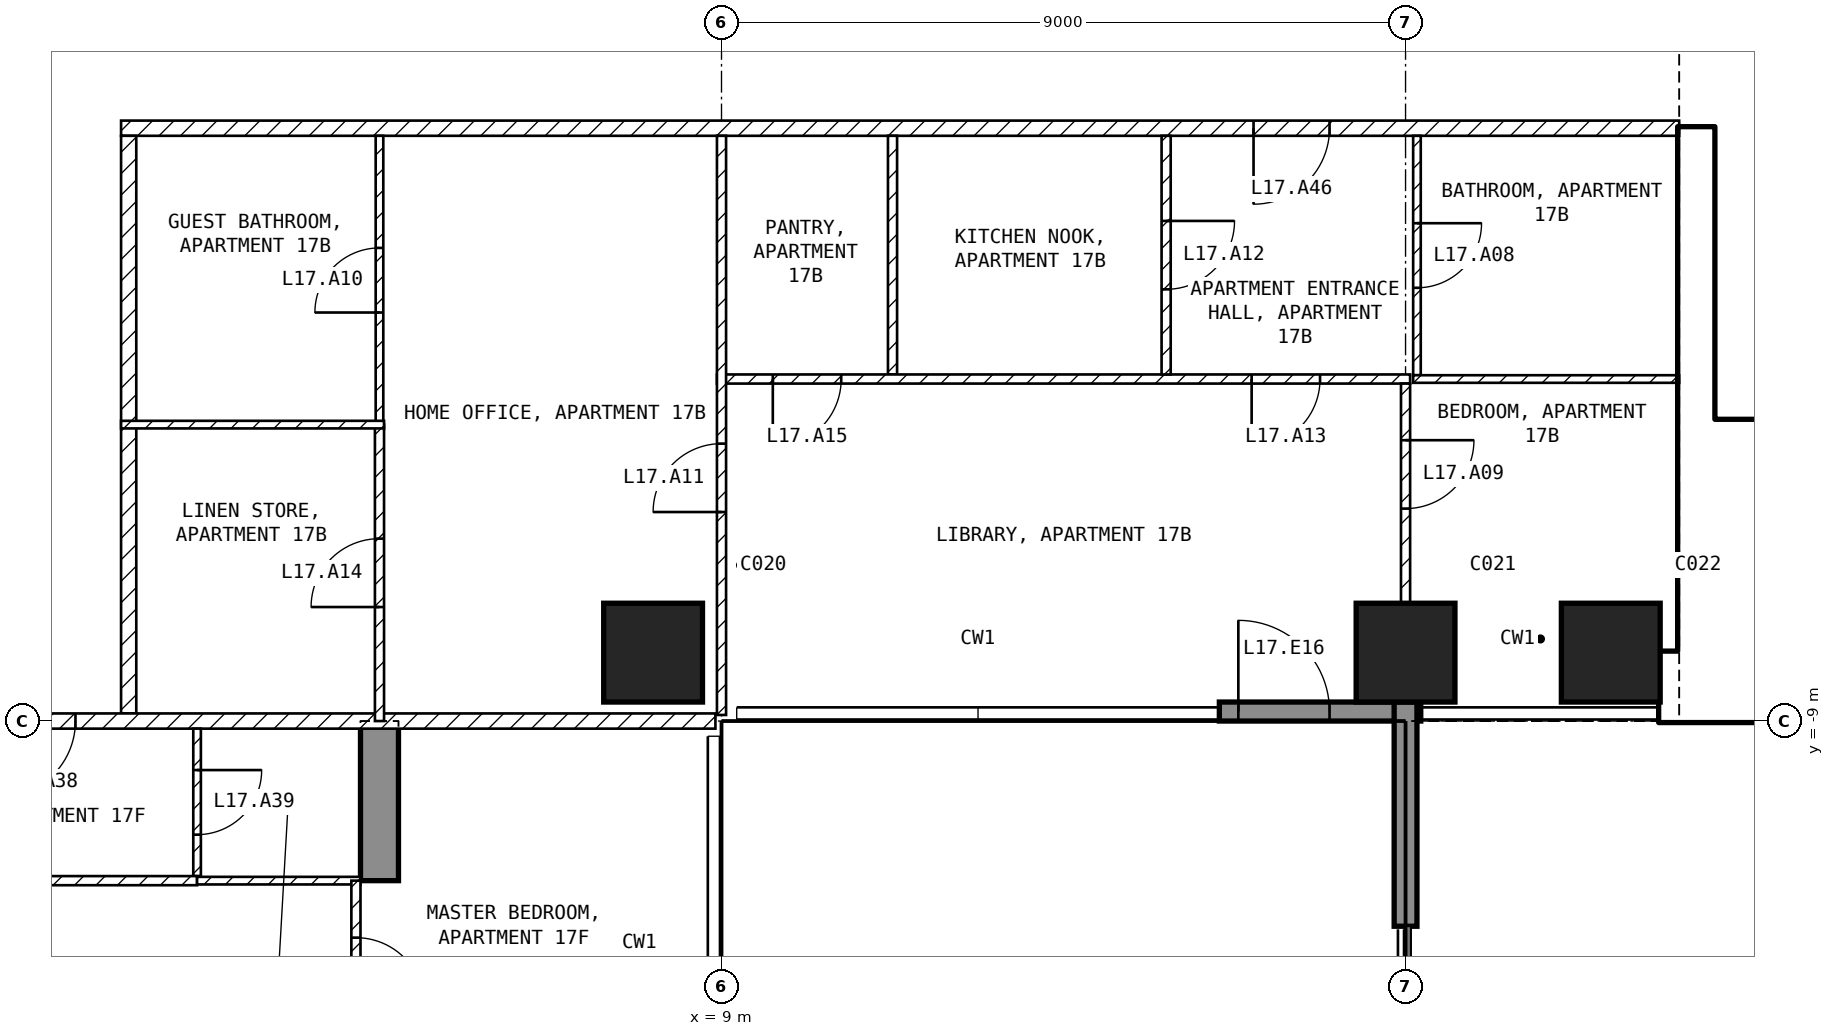
"""IFC4 building model, lengths in metres.
Left out: names, types, materials, properties, quantities, classifications, styles, units other than length and angle.
Written with IfcOpenShell. Run it as: python <this file> out.ifc"""

import sys

from ifc_helpers import new_model, si_unit, direction, frame, frame_2d, origin, origin_2d, place, context, subcontext, project, spatial, polyline, rectangle, outline, extrude, element, fill, save


model = new_model("IFC4")
c1 = context("Model", 3, precision=1e-05, world=origin(), true_north=direction((0.0, 1.0)))
c2 = subcontext(c1, "Body", "Model", "MODEL_VIEW")
j1 = project(units=[si_unit("LENGTHUNIT", "METRE"), si_unit("PLANEANGLEUNIT", "RADIAN")], contexts=[c1])
p1 = place(None, origin())
s1 = spatial("IfcSite", under=j1, at=p1, CompositionType="ELEMENT")
p2 = place(p1, origin())
s2 = spatial("IfcBuilding", under=s1, at=p2, CompositionType="ELEMENT")
p3 = place(p2, frame((0.0, 0.0, 78.5)))
s3 = spatial("IfcBuildingStorey", under=s2, at=p3, CompositionType="ELEMENT", Elevation=78.5)
for number, where, z_axis, x_axis in (
    (1, (8.1, -8.1, -0.25), (0.0, 0.0, 1.0), (1.0, 0.0, 0.0)),
    (2, (18.0, -8.1, -0.25), (0.0, 0.0, 1.0), (1.0, 0.0, 0.0)),
    (3, (20.7, -8.1, -0.25), (0.0, 0.0, 1.0), (1.0, 0.0, 0.0)),
):
    element("IfcColumn", number, at=place(p3, frame(where, z_axis=z_axis, x_axis=x_axis)), inside=s3, PredefinedType="COLUMN", context=c2, shape_type="SweptSolid", body=[
        extrude(rectangle(XDim=1.3, YDim=1.3, at=origin_2d()), origin(), (0.0, 0.0, 1.0), 3.5),
    ])
p4 = place(p3, frame((4.25, -25.45, -0.25), z_axis=(1.0, 0.0, 0.0), x_axis=(0.0, 1.0, 0.0)))
e4 = element("IfcWall", 4, at=p4, inside=s3, PredefinedType="SHEAR", context=c2, shape_type="SweptSolid", body=[
    extrude(outline(polyline([(0.0, 0.0), (4.15, 0.0), (4.15, 2.65), (6.55, 2.65), (6.55, 0.0), (11.95, 0.0), (11.95, 2.65), (14.35, 2.65), (14.35, 0.0), (16.45, 0.0), (16.45, 3.5), (0.0, 3.5), (0.0, 0.0)])), origin(), (0.0, 0.0, 1.0), 0.5),
])
p5 = place(p3, frame((15.55, -8.875, 0.0), z_axis=(0.0, 0.0, 1.0), x_axis=(1.0, 0.0, 0.0)))
e5 = element("IfcWall", 5, at=p5, inside=s3, PredefinedType="SOLIDWALL", context=c2, shape_type="SweptSolid", body=[
    extrude(rectangle(XDim=2.65, YDim=0.25, at=frame_2d((1.325, 0.0))), origin(), (0.0, 0.0, 1.0), 3.25),
])
p6 = place(p5, frame((0.25, 0.0, 0.0)))
e6 = element("IfcOpeningElement", 6, at=p6, cuts=e5, PredefinedType="OPENING", context=c2, shape_type="SweptSolid", body=[
    extrude(rectangle(XDim=1.2, YDim=2.4, at=frame_2d((0.6, 1.2))), frame((0.0, 0.135, 0.0), z_axis=(0.0, -1.0, 0.0), x_axis=(1.0, 0.0, 0.0)), (0.0, 0.0, 1.0), 0.27),
])
p7 = place(p3, frame((18.0, -8.75, 0.0), z_axis=(0.0, 0.0, 1.0), x_axis=(0.0, -1.0, 0.0)))
e7 = element("IfcWall", 7, at=p7, inside=s3, PredefinedType="SOLIDWALL", context=c2, shape_type="SweptSolid", body=[
    extrude(rectangle(XDim=2.95, YDim=0.3, at=frame_2d((1.475, 0.0))), origin(), (0.0, 0.0, 1.0), 3.25),
])
p8 = place(p3, frame((21.35, -8.55, 0.0), z_axis=(0.0, 0.0, 1.0), x_axis=(1.0, 0.0, 0.0)))
e8 = element("IfcWall", 8, at=p8, inside=s3, PredefinedType="SHEAR", context=c2, shape_type="SweptSolid", body=[
    extrude(rectangle(XDim=11.05, YDim=0.9, at=frame_2d((5.525, 0.0))), origin(), (0.0, 0.0, 1.0), 3.25),
])
p9 = place(p3, frame((21.825, -8.1, 0.0), z_axis=(0.0, 0.0, 1.0), x_axis=(0.0, 1.0, 0.0)))
e9 = element("IfcWall", 9, at=p9, inside=s3, PredefinedType="SHEAR", context=c2, shape_type="SweptSolid", body=[
    extrude(rectangle(XDim=6.9, YDim=0.45, at=frame_2d((3.45, 0.0))), origin(), (0.0, 0.0, 1.0), 3.25),
])
p10 = place(p3, frame((22.05, -5.15, 0.0), z_axis=(0.0, 0.0, 1.0), x_axis=(1.0, 0.0, 0.0)))
e10 = element("IfcWall", 10, at=p10, inside=s3, PredefinedType="SOLIDWALL", context=c2, shape_type="SweptSolid", body=[
    extrude(rectangle(XDim=6.3, YDim=0.2, at=frame_2d((3.15, 0.0))), origin(), (0.0, 0.0, 1.0), 3.25),
])
p11 = place(p10, frame((0.2, 0.0, 0.0)))
e11 = element("IfcOpeningElement", 11, at=p11, cuts=e10, PredefinedType="OPENING", context=c2, shape_type="SweptSolid", body=[
    extrude(rectangle(XDim=1.0, YDim=2.1, at=frame_2d((0.5, 1.05))), frame((0.0, 0.11, 0.0), z_axis=(0.0, -1.0, 0.0), x_axis=(1.0, 0.0, 0.0)), (0.0, 0.0, 1.0), 0.22),
])
p12 = place(p3, frame((21.6, -1.2, 0.0), z_axis=(0.0, 0.0, 1.0), x_axis=(-1.0, 0.0, 0.0)))
e12 = element("IfcWall", 12, at=p12, inside=s3, PredefinedType="PARTITIONING", context=c2, shape_type="SweptSolid", body=[
    extrude(rectangle(XDim=20.5, YDim=0.2, at=frame_2d((10.25, 0.0))), origin(), (0.0, 0.0, 1.0), 3.25),
])
p13 = place(p12, frame((4.6, 0.0, 0.0)))
e13 = element("IfcOpeningElement", 13, at=p13, cuts=e12, PredefinedType="OPENING", context=c2, shape_type="SweptSolid", body=[
    extrude(rectangle(XDim=1.0, YDim=2.1, at=frame_2d((0.5, 1.05))), frame((0.0, 0.11, 0.0), z_axis=(0.0, -1.0, 0.0), x_axis=(1.0, 0.0, 0.0)), (0.0, 0.0, 1.0), 0.22),
])
p14 = place(p3, frame((1.2, -1.3, 0.0), z_axis=(0.0, 0.0, 1.0), x_axis=(0.0, -1.0, 0.0)))
e14 = element("IfcWall", 14, at=p14, inside=s3, PredefinedType="PARTITIONING", context=c2, shape_type="SweptSolid", body=[
    extrude(rectangle(XDim=7.6, YDim=0.2, at=frame_2d((3.8, 0.0))), origin(), (0.0, 0.0, 1.0), 3.25),
])
p15 = place(p3, frame((8.92, -9.0, 0.0), z_axis=(0.0, 0.0, 1.0), x_axis=(-1.0, 0.0, 0.0)))
e15 = element("IfcWall", 15, at=p15, inside=s3, PredefinedType="PARTITIONING", context=c2, shape_type="SweptSolid", body=[
    extrude(rectangle(XDim=17.84, YDim=0.2, at=frame_2d((8.92, 0.0))), origin(), (0.0, 0.0, 1.0), 3.25),
])
p16 = place(p15, frame((8.42, 0.0, 0.0)))
e16 = element("IfcOpeningElement", 16, at=p16, cuts=e15, PredefinedType="OPENING", context=c2, shape_type="SweptSolid", body=[
    extrude(rectangle(XDim=1.0, YDim=2.1, at=frame_2d((0.5, 1.05))), frame((0.0, 0.11, 0.0), z_axis=(0.0, -1.0, 0.0), x_axis=(1.0, 0.0, 0.0)), (0.0, 0.0, 1.0), 0.22),
])
p17 = place(p3, frame((11.25, -1.3, 0.0), z_axis=(0.0, 0.0, 1.0), x_axis=(0.0, -1.0, 0.0)))
e17 = element("IfcWall", 17, at=p17, inside=s3, PredefinedType="PARTITIONING", context=c2, shape_type="SweptSolid", body=[
    extrude(rectangle(XDim=3.14, YDim=0.12, at=frame_2d((1.57, 0.0))), origin(), (0.0, 0.0, 1.0), 3.25),
])
p18 = place(p3, frame((18.06, -4.5, 0.0), z_axis=(0.0, 0.0, 1.0), x_axis=(-1.0, 0.0, 0.0)))
e18 = element("IfcWall", 18, at=p18, inside=s3, PredefinedType="PARTITIONING", context=c2, shape_type="SweptSolid", body=[
    extrude(rectangle(XDim=9.12, YDim=0.12, at=frame_2d((4.56, 0.0))), origin(), (0.0, 0.0, 1.0), 3.25),
])
p19 = place(p18, frame((1.185, 0.0, 0.0)))
e19 = element("IfcOpeningElement", 19, at=p19, cuts=e18, PredefinedType="OPENING", context=c2, shape_type="SweptSolid", body=[
    extrude(rectangle(XDim=0.9, YDim=2.1, at=frame_2d((0.45, 1.05))), frame((0.0, 0.07, 0.0), z_axis=(0.0, -1.0, 0.0), x_axis=(1.0, 0.0, 0.0)), (0.0, 0.0, 1.0), 0.14),
])
p20 = place(p18, frame((7.485, 0.0, 0.0)))
e20 = element("IfcOpeningElement", 20, at=p20, cuts=e18, PredefinedType="OPENING", context=c2, shape_type="SweptSolid", body=[
    extrude(rectangle(XDim=0.9, YDim=2.1, at=frame_2d((0.45, 1.05))), frame((0.0, 0.07, 0.0), z_axis=(0.0, -1.0, 0.0), x_axis=(1.0, 0.0, 0.0)), (0.0, 0.0, 1.0), 0.14),
])
p21 = place(p3, frame((9.0, -8.92, 0.0), z_axis=(0.0, 0.0, 1.0), x_axis=(0.0, 1.0, 0.0)))
e21 = element("IfcWall", 21, at=p21, inside=s3, PredefinedType="PARTITIONING", context=c2, shape_type="SweptSolid", body=[
    extrude(rectangle(XDim=7.62, YDim=0.12, at=frame_2d((3.81, 0.0))), origin(), (0.0, 0.0, 1.0), 3.25),
])
p22 = place(p21, frame((2.67, 0.0, 0.0)))
e22 = element("IfcOpeningElement", 22, at=p22, cuts=e21, PredefinedType="OPENING", context=c2, shape_type="SweptSolid", body=[
    extrude(rectangle(XDim=0.9, YDim=2.1, at=frame_2d((0.45, 1.05))), frame((0.0, 0.07, 0.0), z_axis=(0.0, -1.0, 0.0), x_axis=(1.0, 0.0, 0.0)), (0.0, 0.0, 1.0), 0.14),
])
p23 = place(p3, frame((14.85, -1.3, 0.0), z_axis=(0.0, 0.0, 1.0), x_axis=(0.0, -1.0, 0.0)))
e23 = element("IfcWall", 23, at=p23, inside=s3, PredefinedType="PARTITIONING", context=c2, shape_type="SweptSolid", body=[
    extrude(rectangle(XDim=3.14, YDim=0.12, at=frame_2d((1.57, 0.0))), origin(), (0.0, 0.0, 1.0), 3.25),
])
p24 = place(p23, frame((1.12, 0.0, 0.0)))
e24 = element("IfcOpeningElement", 24, at=p24, cuts=e23, PredefinedType="OPENING", context=c2, shape_type="SweptSolid", body=[
    extrude(rectangle(XDim=0.9, YDim=2.1, at=frame_2d((0.45, 1.05))), frame((0.0, 0.07, 0.0), z_axis=(0.0, -1.0, 0.0), x_axis=(1.0, 0.0, 0.0)), (0.0, 0.0, 1.0), 0.14),
])
p25 = place(p3, frame((18.15, -1.3, 0.0), z_axis=(0.0, 0.0, 1.0), x_axis=(0.0, -1.0, 0.0)))
e25 = element("IfcWall", 25, at=p25, inside=s3, PredefinedType="PARTITIONING", context=c2, shape_type="SweptSolid", body=[
    extrude(rectangle(XDim=3.15, YDim=0.1, at=frame_2d((1.575, 0.0))), origin(), (0.0, 0.0, 1.0), 2.346),
])
p26 = place(p25, frame((1.15, 0.0, 0.0)))
e26 = element("IfcOpeningElement", 26, at=p26, cuts=e25, PredefinedType="OPENING", context=c2, shape_type="SweptSolid", body=[
    extrude(rectangle(XDim=0.85, YDim=2.1, at=frame_2d((0.425, 1.05))), frame((0.0, 0.06, 0.0), z_axis=(0.0, -1.0, 0.0), x_axis=(1.0, 0.0, 0.0)), (0.0, 0.0, 1.0), 0.12),
])
p27 = place(p3, frame((21.6, -4.5, 0.0), z_axis=(0.0, 0.0, 1.0), x_axis=(-1.0, 0.0, 0.0)))
e27 = element("IfcWall", 27, at=p27, inside=s3, PredefinedType="PARTITIONING", context=c2, shape_type="SweptSolid", body=[
    extrude(rectangle(XDim=3.5, YDim=0.1, at=frame_2d((1.75, 0.0))), origin(), (0.0, 0.0, 1.0), 3.25),
])
p28 = place(p3, frame((18.0, -4.56, 0.0), z_axis=(0.0, 0.0, 1.0), x_axis=(0.0, -1.0, 0.0)))
e28 = element("IfcWall", 28, at=p28, inside=s3, PredefinedType="PARTITIONING", context=c2, shape_type="SweptSolid", body=[
    extrude(rectangle(XDim=2.89, YDim=0.12, at=frame_2d((1.445, 0.0))), origin(), (0.0, 0.0, 1.0), 2.346),
])
p29 = place(p28, frame((0.745, 0.0, 0.0)))
e29 = element("IfcOpeningElement", 29, at=p29, cuts=e28, PredefinedType="OPENING", context=c2, shape_type="SweptSolid", body=[
    extrude(rectangle(XDim=0.9, YDim=2.1, at=frame_2d((0.45, 1.05))), frame((0.0, 0.07, 0.0), z_axis=(0.0, -1.0, 0.0), x_axis=(1.0, 0.0, 0.0)), (0.0, 0.0, 1.0), 0.14),
])
p30 = place(p3, frame((4.5, -5.1, 0.0), z_axis=(0.0, 0.0, 1.0), x_axis=(0.0, 1.0, 0.0)))
e30 = element("IfcWall", 30, at=p30, inside=s3, PredefinedType="PARTITIONING", context=c2, shape_type="SweptSolid", body=[
    extrude(rectangle(XDim=3.8, YDim=0.1, at=frame_2d((1.9, 0.0))), origin(), (0.0, 0.0, 1.0), 3.25),
])
p31 = place(p30, frame((1.475, 0.0, 0.0)))
e31 = element("IfcOpeningElement", 31, at=p31, cuts=e30, PredefinedType="OPENING", context=c2, shape_type="SweptSolid", body=[
    extrude(rectangle(XDim=0.85, YDim=2.1, at=frame_2d((0.425, 1.05))), frame((0.0, 0.06, 0.0), z_axis=(0.0, -1.0, 0.0), x_axis=(1.0, 0.0, 0.0)), (0.0, 0.0, 1.0), 0.12),
])
p32 = place(p3, frame((4.5, -9.0, 0.0), z_axis=(0.0, 0.0, 1.0), x_axis=(0.0, 1.0, 0.0)))
e32 = element("IfcWall", 32, at=p32, inside=s3, PredefinedType="PARTITIONING", context=c2, shape_type="SweptSolid", body=[
    extrude(rectangle(XDim=3.9, YDim=0.12, at=frame_2d((1.95, 0.0))), origin(), (0.0, 0.0, 1.0), 3.25),
])
p33 = place(p32, frame((1.5, 0.0, 0.0)))
e33 = element("IfcOpeningElement", 33, at=p33, cuts=e32, PredefinedType="OPENING", context=c2, shape_type="SweptSolid", body=[
    extrude(rectangle(XDim=0.9, YDim=2.1, at=frame_2d((0.45, 1.05))), frame((0.0, 0.07, 0.0), z_axis=(0.0, -1.0, 0.0), x_axis=(1.0, 0.0, 0.0)), (0.0, 0.0, 1.0), 0.14),
])
p34 = place(p3, frame((4.56, -5.1, 0.0), z_axis=(0.0, 0.0, 1.0), x_axis=(-1.0, 0.0, 0.0)))
e34 = element("IfcWall", 34, at=p34, inside=s3, PredefinedType="PARTITIONING", context=c2, shape_type="SweptSolid", body=[
    extrude(rectangle(XDim=3.46, YDim=0.1, at=frame_2d((1.73, 0.0))), origin(), (0.0, 0.0, 1.0), 3.25),
])
p35 = place(p3, frame((2.1, -9.1, 0.0), z_axis=(0.0, 0.0, 1.0), x_axis=(0.0, -1.0, 0.0)))
e35 = element("IfcWall", 35, at=p35, inside=s3, PredefinedType="PARTITIONING", context=c2, shape_type="SweptSolid", body=[
    extrude(rectangle(XDim=1.94, YDim=0.1, at=frame_2d((0.97, 0.0))), origin(), (0.0, 0.0, 1.0), 3.25),
])
p36 = place(p35, frame((0.545, 0.0, 0.0)))
e36 = element("IfcOpeningElement", 36, at=p36, cuts=e35, PredefinedType="OPENING", context=c2, shape_type="SweptSolid", body=[
    extrude(rectangle(XDim=0.85, YDim=2.1, at=frame_2d((0.425, 1.05))), frame((0.0, 0.06, 0.0), z_axis=(0.0, -1.0, 0.0), x_axis=(1.0, 0.0, 0.0)), (0.0, 0.0, 1.0), 0.12),
])
p37 = place(p3, frame((2.1, -11.1, 0.0), z_axis=(0.0, 0.0, 1.0), x_axis=(-1.0, 0.0, 0.0)))
e37 = element("IfcWall", 37, at=p37, inside=s3, PredefinedType="PARTITIONING", context=c2, shape_type="SweptSolid", body=[
    extrude(rectangle(XDim=6.35, YDim=0.12, at=frame_2d((3.175, 0.0))), origin(), (0.0, 0.0, 1.0), 3.25),
])
p38 = place(p37, frame((2.725, 0.0, 0.0)))
e38 = element("IfcOpeningElement", 38, at=p38, cuts=e37, PredefinedType="OPENING", context=c2, shape_type="SweptSolid", body=[
    extrude(rectangle(XDim=0.9, YDim=2.1, at=frame_2d((0.45, 1.05))), frame((0.0, 0.07, 0.0), z_axis=(0.0, -1.0, 0.0), x_axis=(1.0, 0.0, 0.0)), (0.0, 0.0, 1.0), 0.14),
])
p39 = place(p3, frame((4.25, -11.1, 0.0), z_axis=(0.0, 0.0, 1.0), x_axis=(-1.0, 0.0, 0.0)))
e39 = element("IfcWall", 39, at=p39, inside=s3, PredefinedType="PARTITIONING", context=c2, shape_type="SweptSolid", body=[
    extrude(rectangle(XDim=2.15, YDim=0.1, at=frame_2d((1.075, 0.0))), origin(), (0.0, 0.0, 1.0), 3.25),
])
p40 = place(p3, frame((4.19, -11.1, 0.0), z_axis=(0.0, 0.0, 1.0), x_axis=(0.0, -1.0, 0.0)))
e40 = element("IfcWall", 40, at=p40, inside=s3, PredefinedType="PARTITIONING", context=c2, shape_type="SweptSolid", body=[
    extrude(rectangle(XDim=2.4, YDim=0.12, at=frame_2d((1.2, 0.0))), origin(), (0.0, 0.0, 1.0), 2.4),
])
p41 = place(p40, frame((0.75, 0.0, 0.0)))
e41 = element("IfcOpeningElement", 41, at=p41, cuts=e40, PredefinedType="OPENING", context=c2, shape_type="SweptSolid", body=[
    extrude(rectangle(XDim=0.9, YDim=2.1, at=frame_2d((0.45, 1.05))), frame((0.0, 0.07, 0.0), z_axis=(0.0, -1.0, 0.0), x_axis=(1.0, 0.0, 0.0)), (0.0, 0.0, 1.0), 0.14),
])
p42 = place(p6, origin())
e42 = element("IfcDoor", 42, at=p42, inside=s3, OperationType="SINGLE_SWING_LEFT", PredefinedType="DOOR", context=c2, shape_type="SweptSolid", body=[
    extrude(rectangle(XDim=1.2, YDim=2.4, at=frame_2d((0.6, 1.2))), frame((0.0, 0.025, 0.0), z_axis=(0.0, -1.0, 0.0), x_axis=(1.0, 0.0, 0.0)), (0.0, 0.0, 1.0), 0.05),
])
fill(e6, e42)
p43 = place(p11, origin())
e43 = element("IfcDoor", 43, at=p43, inside=s3, OperationType="SINGLE_SWING_LEFT", PredefinedType="DOOR", context=c2, shape_type="SweptSolid", body=[
    extrude(rectangle(XDim=1.0, YDim=2.1, at=frame_2d((0.5, 1.05))), frame((0.0, 0.025, 0.0), z_axis=(0.0, -1.0, 0.0), x_axis=(1.0, 0.0, 0.0)), (0.0, 0.0, 1.0), 0.05),
])
fill(e11, e43)
p44 = place(p26, origin())
e44 = element("IfcDoor", 44, at=p44, inside=s3, OperationType="SINGLE_SWING_LEFT", PredefinedType="DOOR", context=c2, shape_type="SweptSolid", body=[
    extrude(rectangle(XDim=0.85, YDim=2.1, at=frame_2d((0.425, 1.05))), frame((0.0, 0.025, 0.0), z_axis=(0.0, -1.0, 0.0), x_axis=(1.0, 0.0, 0.0)), (0.0, 0.0, 1.0), 0.05),
])
fill(e26, e44)
p45 = place(p29, origin())
e45 = element("IfcDoor", 45, at=p45, inside=s3, OperationType="SINGLE_SWING_LEFT", PredefinedType="DOOR", context=c2, shape_type="SweptSolid", body=[
    extrude(rectangle(XDim=0.9, YDim=2.1, at=frame_2d((0.45, 1.05))), frame((0.0, 0.025, 0.0), z_axis=(0.0, -1.0, 0.0), x_axis=(1.0, 0.0, 0.0)), (0.0, 0.0, 1.0), 0.05),
])
fill(e29, e45)
p46 = place(p31, origin())
e46 = element("IfcDoor", 46, at=p46, inside=s3, OperationType="SINGLE_SWING_LEFT", PredefinedType="DOOR", context=c2, shape_type="SweptSolid", body=[
    extrude(rectangle(XDim=0.85, YDim=2.1, at=frame_2d((0.425, 1.05))), frame((0.0, 0.025, 0.0), z_axis=(0.0, -1.0, 0.0), x_axis=(1.0, 0.0, 0.0)), (0.0, 0.0, 1.0), 0.05),
])
fill(e31, e46)
p47 = place(p22, origin())
e47 = element("IfcDoor", 47, at=p47, inside=s3, OperationType="SINGLE_SWING_LEFT", PredefinedType="DOOR", context=c2, shape_type="SweptSolid", body=[
    extrude(rectangle(XDim=0.9, YDim=2.1, at=frame_2d((0.45, 1.05))), frame((0.0, 0.025, 0.0), z_axis=(0.0, -1.0, 0.0), x_axis=(1.0, 0.0, 0.0)), (0.0, 0.0, 1.0), 0.05),
])
fill(e22, e47)
p48 = place(p24, origin())
e48 = element("IfcDoor", 48, at=p48, inside=s3, OperationType="SINGLE_SWING_LEFT", PredefinedType="DOOR", context=c2, shape_type="SweptSolid", body=[
    extrude(rectangle(XDim=0.9, YDim=2.1, at=frame_2d((0.45, 1.05))), frame((0.0, 0.025, 0.0), z_axis=(0.0, -1.0, 0.0), x_axis=(1.0, 0.0, 0.0)), (0.0, 0.0, 1.0), 0.05),
])
fill(e24, e48)
p49 = place(p19, origin())
e49 = element("IfcDoor", 49, at=p49, inside=s3, OperationType="SINGLE_SWING_RIGHT", PredefinedType="DOOR", context=c2, shape_type="SweptSolid", body=[
    extrude(rectangle(XDim=0.9, YDim=2.1, at=frame_2d((0.45, 1.05))), frame((0.0, 0.025, 0.0), z_axis=(0.0, -1.0, 0.0), x_axis=(1.0, 0.0, 0.0)), (0.0, 0.0, 1.0), 0.05),
])
fill(e19, e49)
p50 = place(p33, origin())
e50 = element("IfcDoor", 50, at=p50, inside=s3, OperationType="SINGLE_SWING_LEFT", PredefinedType="DOOR", context=c2, shape_type="SweptSolid", body=[
    extrude(rectangle(XDim=0.9, YDim=2.1, at=frame_2d((0.45, 1.05))), frame((0.0, 0.025, 0.0), z_axis=(0.0, -1.0, 0.0), x_axis=(1.0, 0.0, 0.0)), (0.0, 0.0, 1.0), 0.05),
])
fill(e33, e50)
p51 = place(p20, origin())
e51 = element("IfcDoor", 51, at=p51, inside=s3, OperationType="SINGLE_SWING_RIGHT", PredefinedType="DOOR", context=c2, shape_type="SweptSolid", body=[
    extrude(rectangle(XDim=0.9, YDim=2.1, at=frame_2d((0.45, 1.05))), frame((0.0, 0.025, 0.0), z_axis=(0.0, -1.0, 0.0), x_axis=(1.0, 0.0, 0.0)), (0.0, 0.0, 1.0), 0.05),
])
fill(e20, e51)
p52 = place(p16, origin())
e52 = element("IfcDoor", 52, at=p52, inside=s3, OperationType="SINGLE_SWING_RIGHT", PredefinedType="DOOR", context=c2, shape_type="SweptSolid", body=[
    extrude(rectangle(XDim=1.0, YDim=2.1, at=frame_2d((0.5, 1.05))), frame((0.0, 0.025, 0.0), z_axis=(0.0, -1.0, 0.0), x_axis=(1.0, 0.0, 0.0)), (0.0, 0.0, 1.0), 0.05),
])
fill(e16, e52)
p53 = place(p36, origin())
e53 = element("IfcDoor", 53, at=p53, inside=s3, OperationType="SINGLE_SWING_LEFT", PredefinedType="DOOR", context=c2, shape_type="SweptSolid", body=[
    extrude(rectangle(XDim=0.85, YDim=2.1, at=frame_2d((0.425, 1.05))), frame((0.0, 0.025, 0.0), z_axis=(0.0, -1.0, 0.0), x_axis=(1.0, 0.0, 0.0)), (0.0, 0.0, 1.0), 0.05),
])
fill(e36, e53)
p54 = place(p13, origin())
e54 = element("IfcDoor", 54, at=p54, inside=s3, OperationType="SINGLE_SWING_RIGHT", PredefinedType="DOOR", context=c2, shape_type="SweptSolid", body=[
    extrude(rectangle(XDim=1.0, YDim=2.1, at=frame_2d((0.5, 1.05))), frame((0.0, 0.025, 0.0), z_axis=(0.0, -1.0, 0.0), x_axis=(1.0, 0.0, 0.0)), (0.0, 0.0, 1.0), 0.05),
])
fill(e13, e54)
p55 = place(p41, origin())
e55 = element("IfcDoor", 55, at=p55, inside=s3, OperationType="SINGLE_SWING_RIGHT", PredefinedType="DOOR", context=c2, shape_type="SweptSolid", body=[
    extrude(rectangle(XDim=0.9, YDim=2.1, at=frame_2d((0.45, 1.05))), frame((0.0, 0.025, 0.0), z_axis=(0.0, -1.0, 0.0), x_axis=(1.0, 0.0, 0.0)), (0.0, 0.0, 1.0), 0.05),
])
fill(e41, e55)
save(model, sys.argv[1])
